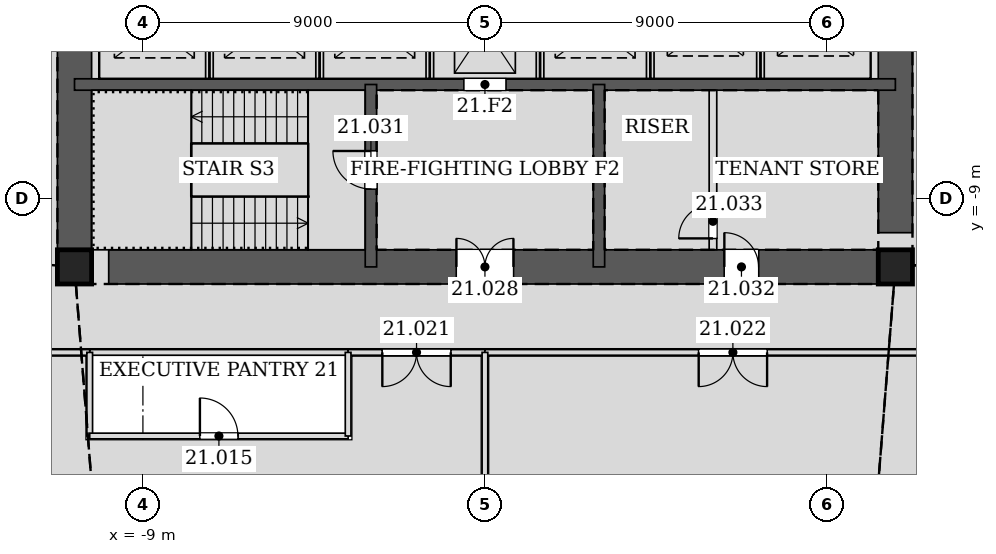
"""IFC4 building model, lengths in metres.
Left out: names, types, materials, properties, quantities, classifications, styles, units other than length and angle.
Written with IfcOpenShell. Run it as: python <this file> out.ifc"""

import sys

from ifc_helpers import new_model, si_unit, direction, frame, frame_2d, origin, origin_2d, place, context, subcontext, project, spatial, rectangle, hollow_rectangle, extrude, element, fill, save


model = new_model("IFC4")
c1 = context("Model", 3, precision=1e-05, world=origin(), true_north=direction((0.0, 1.0)))
c2 = subcontext(c1, "Body", "Model", "MODEL_VIEW")
j1 = project(units=[si_unit("LENGTHUNIT", "METRE"), si_unit("PLANEANGLEUNIT", "RADIAN")], contexts=[c1])
p1 = place(None, origin())
s1 = spatial("IfcSite", under=j1, at=p1, CompositionType="ELEMENT")
p2 = place(p1, origin())
s2 = spatial("IfcBuilding", under=s1, at=p2, CompositionType="ELEMENT")
p3 = place(p2, frame((0.0, 0.0, 96.0)))
s3 = spatial("IfcBuildingStorey", under=s2, at=p3, CompositionType="ELEMENT", Elevation=96.0)
for number, where, z_axis, x_axis in (
    (1, (-10.8, -10.8, 0.0), (0.0, 0.0, 1.0), (1.0, 0.0, 0.0)),
    (2, (10.8, -10.8, 0.0), (0.0, 0.0, 1.0), (1.0, 0.0, 0.0)),
):
    element("IfcColumn", number, at=place(p3, frame(where, z_axis=z_axis, x_axis=x_axis)), inside=s3, PredefinedType="COLUMN", context=c2, shape_type="SweptSolid", body=[
        extrude(hollow_rectangle(XDim=0.9, YDim=0.9, WallThickness=0.06, at=origin_2d()), origin(), (0.0, 0.0, 1.0), 4.2),
    ])
p4 = place(p3, frame((-10.8, -10.8, 0.0), z_axis=(0.0, 0.0, 1.0), x_axis=(1.0, 0.0, 0.0)))
e3 = element("IfcWall", 3, at=p4, inside=s3, PredefinedType="SOLIDWALL", context=c2, shape_type="SweptSolid", body=[
    extrude(rectangle(XDim=21.6, YDim=0.9, at=frame_2d((10.8, 0.0))), origin(), (0.0, 0.0, 1.0), 4.2),
])
p5 = place(p4, frame((10.05, 0.0, 0.0)))
e4 = element("IfcOpeningElement", 4, at=p5, cuts=e3, PredefinedType="OPENING", context=c2, shape_type="SweptSolid", body=[
    extrude(rectangle(XDim=1.5, YDim=2.1, at=frame_2d((0.75, 1.05))), frame((0.0, 0.46, 0.0), z_axis=(0.0, -1.0, 0.0), x_axis=(1.0, 0.0, 0.0)), (0.0, 0.0, 1.0), 0.92),
])
p6 = place(p4, frame((17.1, 0.0, 0.0)))
e5 = element("IfcOpeningElement", 5, at=p6, cuts=e3, PredefinedType="OPENING", context=c2, shape_type="SweptSolid", body=[
    extrude(rectangle(XDim=0.9, YDim=2.1, at=frame_2d((0.45, 1.05))), frame((0.0, 0.46, 0.0), z_axis=(0.0, -1.0, 0.0), x_axis=(1.0, 0.0, 0.0)), (0.0, 0.0, 1.0), 0.92),
])
p7 = place(p3, frame((10.8, -10.8, 0.0), z_axis=(0.0, 0.0, 1.0), x_axis=(0.0, 1.0, 0.0)))
e6 = element("IfcWall", 6, at=p7, inside=s3, PredefinedType="SOLIDWALL", context=c2, shape_type="SweptSolid", body=[
    extrude(rectangle(XDim=21.6, YDim=0.9, at=frame_2d((10.8, 0.0))), origin(), (0.0, 0.0, 1.0), 4.2),
])
p8 = place(p7, frame((11.7, 0.0, 0.0)))
e7 = element("IfcOpeningElement", 7, at=p8, cuts=e6, PredefinedType="OPENING", context=c2, shape_type="SweptSolid", body=[
    extrude(rectangle(XDim=1.2, YDim=2.1, at=frame_2d((0.6, 1.05))), frame((0.0, 0.46, 0.0), z_axis=(0.0, -1.0, 0.0), x_axis=(1.0, 0.0, 0.0)), (0.0, 0.0, 1.0), 0.92),
])
p9 = place(p7, frame((8.7, 0.0, 0.0)))
e8 = element("IfcOpeningElement", 8, at=p9, cuts=e6, PredefinedType="OPENING", context=c2, shape_type="SweptSolid", body=[
    extrude(rectangle(XDim=1.2, YDim=2.1, at=frame_2d((0.6, 1.05))), frame((0.0, 0.46, 0.0), z_axis=(0.0, -1.0, 0.0), x_axis=(1.0, 0.0, 0.0)), (0.0, 0.0, 1.0), 0.92),
])
p10 = place(p3, frame((-10.8, 10.8, 0.0), z_axis=(0.0, 0.0, 1.0), x_axis=(0.0, -1.0, 0.0)))
e9 = element("IfcWall", 9, at=p10, inside=s3, PredefinedType="SOLIDWALL", context=c2, shape_type="SweptSolid", body=[
    extrude(rectangle(XDim=21.6, YDim=0.9, at=frame_2d((10.8, 0.0))), origin(), (0.0, 0.0, 1.0), 4.2),
])
p11 = place(p10, frame((8.7, 0.0, 0.0)))
e10 = element("IfcOpeningElement", 10, at=p11, cuts=e9, PredefinedType="OPENING", context=c2, shape_type="SweptSolid", body=[
    extrude(rectangle(XDim=1.2, YDim=2.1, at=frame_2d((0.6, 1.05))), frame((0.0, 0.46, 0.0), z_axis=(0.0, -1.0, 0.0), x_axis=(1.0, 0.0, 0.0)), (0.0, 0.0, 1.0), 0.92),
])
p12 = place(p10, frame((11.7, 0.0, 0.0)))
e11 = element("IfcOpeningElement", 11, at=p12, cuts=e9, PredefinedType="OPENING", context=c2, shape_type="SweptSolid", body=[
    extrude(rectangle(XDim=1.2, YDim=2.1, at=frame_2d((0.6, 1.05))), frame((0.0, 0.46, 0.0), z_axis=(0.0, -1.0, 0.0), x_axis=(1.0, 0.0, 0.0)), (0.0, 0.0, 1.0), 0.92),
])
p13 = place(p3, frame((-10.8, -6.0, 0.0), z_axis=(0.0, 0.0, 1.0), x_axis=(1.0, 0.0, 0.0)))
e12 = element("IfcWall", 12, at=p13, inside=s3, PredefinedType="SOLIDWALL", context=c2, shape_type="SweptSolid", body=[
    extrude(rectangle(XDim=21.6, YDim=0.3, at=frame_2d((10.8, 0.0))), origin(), (0.0, 0.0, 1.0), 4.2),
])
p14 = place(p13, frame((10.25, 0.0, 0.0)))
e13 = element("IfcOpeningElement", 13, at=p14, cuts=e12, PredefinedType="OPENING", context=c2, shape_type="SweptSolid", body=[
    extrude(rectangle(XDim=1.1, YDim=2.1, at=frame_2d((0.55, 1.05))), frame((0.0, 0.16, 0.0), z_axis=(0.0, -1.0, 0.0), x_axis=(1.0, 0.0, 0.0)), (0.0, 0.0, 1.0), 0.32),
])
p15 = place(p3, frame((-3.0, -6.0, 0.0), z_axis=(0.0, 0.0, 1.0), x_axis=(0.0, -1.0, 0.0)))
e14 = element("IfcWall", 14, at=p15, inside=s3, PredefinedType="SOLIDWALL", context=c2, shape_type="SweptSolid", body=[
    extrude(rectangle(XDim=4.8, YDim=0.3, at=frame_2d((2.4, 0.0))), origin(), (0.0, 0.0, 1.0), 4.2),
])
p16 = place(p15, frame((1.75, 0.0, 0.0)))
e15 = element("IfcOpeningElement", 15, at=p16, cuts=e14, PredefinedType="OPENING", context=c2, shape_type="SweptSolid", body=[
    extrude(rectangle(XDim=1.0, YDim=2.1, at=frame_2d((0.5, 1.05))), frame((0.0, 0.16, 0.0), z_axis=(0.0, -1.0, 0.0), x_axis=(1.0, 0.0, 0.0)), (0.0, 0.0, 1.0), 0.32),
])
p17 = place(p3, frame((3.0, -6.0, 0.0), z_axis=(0.0, 0.0, 1.0), x_axis=(0.0, -1.0, 0.0)))
e16 = element("IfcWall", 16, at=p17, inside=s3, PredefinedType="SOLIDWALL", context=c2, shape_type="SweptSolid", body=[
    extrude(rectangle(XDim=4.8, YDim=0.3, at=frame_2d((2.4, 0.0))), origin(), (0.0, 0.0, 1.0), 4.2),
])
p18 = place(p3, frame((-10.401, -13.05, 0.0), z_axis=(0.0, 0.0, 1.0), x_axis=(1.0, 0.0, 0.0)))
e17 = element("IfcWall", 17, at=p18, inside=s3, PredefinedType="PARTITIONING", context=c2, shape_type="SweptSolid", body=[
    extrude(rectangle(XDim=6.802, YDim=0.15, at=frame_2d((3.401, 0.0))), origin(), (0.0, 0.0, 1.0), 3.014),
])
p19 = place(p3, frame((-13.05, -13.05, 0.0), z_axis=(0.0, 0.0, 1.0), x_axis=(1.0, 0.0, 0.0)))
e18 = element("IfcWall", 18, at=p19, inside=s3, PredefinedType="PARTITIONING", context=c2, shape_type="SweptSolid", body=[
    extrude(rectangle(XDim=2.651, YDim=0.15, at=frame_2d((1.326, 0.0))), origin(), (0.0, 0.0, 1.0), 3.014),
])
p20 = place(p3, frame((-3.601, -13.05, 0.0), z_axis=(0.0, 0.0, 1.0), x_axis=(1.0, 0.0, 0.0)))
e19 = element("IfcWall", 19, at=p20, inside=s3, PredefinedType="PARTITIONING", context=c2, shape_type="SweptSolid", body=[
    extrude(rectangle(XDim=3.602, YDim=0.15, at=frame_2d((1.801, 0.0))), origin(), (0.0, 0.0, 1.0), 3.014),
])
p21 = place(p20, frame((0.901, 0.0, 0.0)))
e20 = element("IfcOpeningElement", 20, at=p21, cuts=e19, PredefinedType="OPENING", context=c2, shape_type="SweptSolid", body=[
    extrude(rectangle(XDim=1.8, YDim=2.4, at=frame_2d((0.9, 1.2))), frame((0.0, 0.085, 0.0), z_axis=(0.0, -1.0, 0.0), x_axis=(1.0, 0.0, 0.0)), (0.0, 0.0, 1.0), 0.17),
])
p22 = place(p3, frame((-0.001, -13.05, 0.0), z_axis=(0.0, 0.0, 1.0), x_axis=(1.0, 0.0, 0.0)))
e21 = element("IfcWall", 21, at=p22, inside=s3, PredefinedType="PARTITIONING", context=c2, shape_type="SweptSolid", body=[
    extrude(rectangle(XDim=13.051, YDim=0.15, at=frame_2d((6.525, 0.0))), origin(), (0.0, 0.0, 1.0), 3.014),
])
p23 = place(p22, frame((5.625, 0.0, 0.0)))
e22 = element("IfcOpeningElement", 22, at=p23, cuts=e21, PredefinedType="OPENING", context=c2, shape_type="SweptSolid", body=[
    extrude(rectangle(XDim=1.8, YDim=2.4, at=frame_2d((0.9, 1.2))), frame((0.0, 0.085, 0.0), z_axis=(0.0, -1.0, 0.0), x_axis=(1.0, 0.0, 0.0)), (0.0, 0.0, 1.0), 0.17),
])
p24 = place(p3, frame((-10.4, -13.05, 0.0), z_axis=(0.0, 0.0, 1.0), x_axis=(0.0, -1.0, 0.0)))
e23 = element("IfcWall", 23, at=p24, inside=s3, PredefinedType="PARTITIONING", context=c2, shape_type="SweptSolid", body=[
    extrude(rectangle(XDim=2.2, YDim=0.15, at=frame_2d((1.1, 0.0))), origin(), (0.0, 0.0, 1.0), 3.014),
])
p25 = place(p3, frame((-10.4, -15.25, 0.0), z_axis=(0.0, 0.0, 1.0), x_axis=(1.0, 0.0, 0.0)))
e24 = element("IfcWall", 24, at=p25, inside=s3, PredefinedType="PARTITIONING", context=c2, shape_type="SweptSolid", body=[
    extrude(rectangle(XDim=6.8, YDim=0.15, at=frame_2d((3.4, 0.0))), origin(), (0.0, 0.0, 1.0), 3.014),
])
p26 = place(p25, frame((2.9, 0.0, 0.0)))
e25 = element("IfcOpeningElement", 25, at=p26, cuts=e24, PredefinedType="OPENING", context=c2, shape_type="SweptSolid", body=[
    extrude(rectangle(XDim=1.0, YDim=2.1, at=frame_2d((0.5, 1.05))), frame((0.0, 0.085, 0.0), z_axis=(0.0, -1.0, 0.0), x_axis=(1.0, 0.0, 0.0)), (0.0, 0.0, 1.0), 0.17),
])
p27 = place(p3, frame((-3.6, -15.25, 0.0), z_axis=(0.0, 0.0, 1.0), x_axis=(0.0, 1.0, 0.0)))
e26 = element("IfcWall", 26, at=p27, inside=s3, PredefinedType="PARTITIONING", context=c2, shape_type="SweptSolid", body=[
    extrude(rectangle(XDim=2.2, YDim=0.15, at=frame_2d((1.1, 0.0))), origin(), (0.0, 0.0, 1.0), 3.492),
])
p28 = place(p3, frame((0.0, -18.849, 0.0), z_axis=(0.0, 0.0, 1.0), x_axis=(0.0, 1.0, 0.0)))
e27 = element("IfcWall", 27, at=p28, inside=s3, PredefinedType="PARTITIONING", context=c2, shape_type="SweptSolid", body=[
    extrude(rectangle(XDim=5.799, YDim=0.15, at=frame_2d((2.899, 0.0))), origin(), (0.0, 0.0, 1.0), 3.014),
])
for number, where, z_axis, x_axis in (
    (28, (-7.25, -5.85, 0.0), (0.0, 0.0, 1.0), (0.0, 1.0, 0.0)),
    (29, (-4.35, -5.85, 0.0), (0.0, 0.0, 1.0), (0.0, 1.0, 0.0)),
    (30, (-1.45, -5.85, 0.0), (0.0, 0.0, 1.0), (0.0, 1.0, 0.0)),
    (31, (1.45, -5.85, 0.0), (0.0, 0.0, 1.0), (0.0, 1.0, 0.0)),
    (32, (4.35, -5.85, 0.0), (0.0, 0.0, 1.0), (0.0, 1.0, 0.0)),
    (33, (7.25, -5.85, 0.0), (0.0, 0.0, 1.0), (0.0, 1.0, 0.0)),
):
    element("IfcWall", number, at=place(p3, frame(where, z_axis=z_axis, x_axis=x_axis)), inside=s3, PredefinedType="PARTITIONING", context=c2, shape_type="SweptSolid", body=[
        extrude(rectangle(XDim=2.7, YDim=0.2, at=frame_2d((1.35, 0.0))), origin(), (0.0, 0.0, 1.0), 4.2),
    ])
p29 = place(p3, frame((6.0, -10.35, 0.0), z_axis=(0.0, 0.0, 1.0), x_axis=(0.0, 1.0, 0.0)))
e34 = element("IfcWall", 34, at=p29, inside=s3, PredefinedType="PARTITIONING", context=c2, shape_type="SweptSolid", body=[
    extrude(rectangle(XDim=4.2, YDim=0.2, at=frame_2d((2.1, 0.0))), origin(), (0.0, 0.0, 1.0), 4.035),
])
p30 = place(p29, frame((0.3, 0.0, 0.0)))
e35 = element("IfcOpeningElement", 35, at=p30, cuts=e34, PredefinedType="OPENING", context=c2, shape_type="SweptSolid", body=[
    extrude(rectangle(XDim=0.9, YDim=2.1, at=frame_2d((0.45, 1.05))), frame((0.0, 0.11, 0.0), z_axis=(0.0, -1.0, 0.0), x_axis=(1.0, 0.0, 0.0)), (0.0, 0.0, 1.0), 0.22),
])
p31 = place(p26, origin())
e36 = element("IfcDoor", 36, at=p31, inside=s3, OperationType="SINGLE_SWING_LEFT", PredefinedType="DOOR", context=c2, shape_type="SweptSolid", body=[
    extrude(rectangle(XDim=1.0, YDim=2.1, at=frame_2d((0.5, 1.05))), frame((0.0, 0.025, 0.0), z_axis=(0.0, -1.0, 0.0), x_axis=(1.0, 0.0, 0.0)), (0.0, 0.0, 1.0), 0.05),
])
fill(e25, e36)
p32 = place(p21, frame((1.8, 0.0, 0.0), z_axis=(0.0, 0.0, 1.0), x_axis=(-1.0, 0.0, 0.0)))
e37 = element("IfcDoor", 37, at=p32, inside=s3, OperationType="DOUBLE_DOOR_SINGLE_SWING", PredefinedType="DOOR", context=c2, shape_type="SweptSolid", body=[
    extrude(rectangle(XDim=1.8, YDim=2.4, at=frame_2d((0.9, 1.2))), frame((0.0, 0.025, 0.0), z_axis=(0.0, -1.0, 0.0), x_axis=(1.0, 0.0, 0.0)), (0.0, 0.0, 1.0), 0.05),
])
fill(e20, e37)
p33 = place(p23, frame((1.8, 0.0, 0.0), z_axis=(0.0, 0.0, 1.0), x_axis=(-1.0, 0.0, 0.0)))
e38 = element("IfcDoor", 38, at=p33, inside=s3, OperationType="DOUBLE_DOOR_SINGLE_SWING", PredefinedType="DOOR", context=c2, shape_type="SweptSolid", body=[
    extrude(rectangle(XDim=1.8, YDim=2.4, at=frame_2d((0.9, 1.2))), frame((0.0, 0.025, 0.0), z_axis=(0.0, -1.0, 0.0), x_axis=(1.0, 0.0, 0.0)), (0.0, 0.0, 1.0), 0.05),
])
fill(e22, e38)
p34 = place(p5, origin())
e39 = element("IfcDoor", 39, at=p34, inside=s3, OperationType="DOUBLE_DOOR_SINGLE_SWING", PredefinedType="DOOR", context=c2, shape_type="SweptSolid", body=[
    extrude(rectangle(XDim=1.5, YDim=2.1, at=frame_2d((0.75, 1.05))), frame((0.0, 0.025, 0.0), z_axis=(0.0, -1.0, 0.0), x_axis=(1.0, 0.0, 0.0)), (0.0, 0.0, 1.0), 0.05),
])
fill(e4, e39)
p35 = place(p16, frame((1.0, 0.0, 0.0), z_axis=(0.0, 0.0, 1.0), x_axis=(-1.0, 0.0, 0.0)))
e40 = element("IfcDoor", 40, at=p35, inside=s3, OperationType="SINGLE_SWING_RIGHT", PredefinedType="DOOR", context=c2, shape_type="SweptSolid", body=[
    extrude(rectangle(XDim=1.0, YDim=2.1, at=frame_2d((0.5, 1.05))), frame((0.0, 0.025, 0.0), z_axis=(0.0, -1.0, 0.0), x_axis=(1.0, 0.0, 0.0)), (0.0, 0.0, 1.0), 0.05),
])
fill(e15, e40)
p36 = place(p6, origin())
e41 = element("IfcDoor", 41, at=p36, inside=s3, OperationType="SINGLE_SWING_LEFT", PredefinedType="DOOR", context=c2, shape_type="SweptSolid", body=[
    extrude(rectangle(XDim=0.9, YDim=2.1, at=frame_2d((0.45, 1.05))), frame((0.0, 0.025, 0.0), z_axis=(0.0, -1.0, 0.0), x_axis=(1.0, 0.0, 0.0)), (0.0, 0.0, 1.0), 0.05),
])
fill(e5, e41)
p37 = place(p30, origin())
e42 = element("IfcDoor", 42, at=p37, inside=s3, OperationType="SINGLE_SWING_LEFT", PredefinedType="DOOR", context=c2, shape_type="SweptSolid", body=[
    extrude(rectangle(XDim=0.9, YDim=2.1, at=frame_2d((0.45, 1.05))), frame((0.0, 0.025, 0.0), z_axis=(0.0, -1.0, 0.0), x_axis=(1.0, 0.0, 0.0)), (0.0, 0.0, 1.0), 0.05),
])
fill(e35, e42)
p38 = place(p14, origin())
e43 = element("IfcDoor", 43, at=p38, inside=s3, OperationType="DOUBLE_DOOR_SLIDING", PredefinedType="DOOR", context=c2, shape_type="SweptSolid", body=[
    extrude(rectangle(XDim=1.1, YDim=2.1, at=frame_2d((0.55, 1.05))), frame((0.0, 0.025, 0.0), z_axis=(0.0, -1.0, 0.0), x_axis=(1.0, 0.0, 0.0)), (0.0, 0.0, 1.0), 0.05),
])
fill(e13, e43)
save(model, sys.argv[1])
